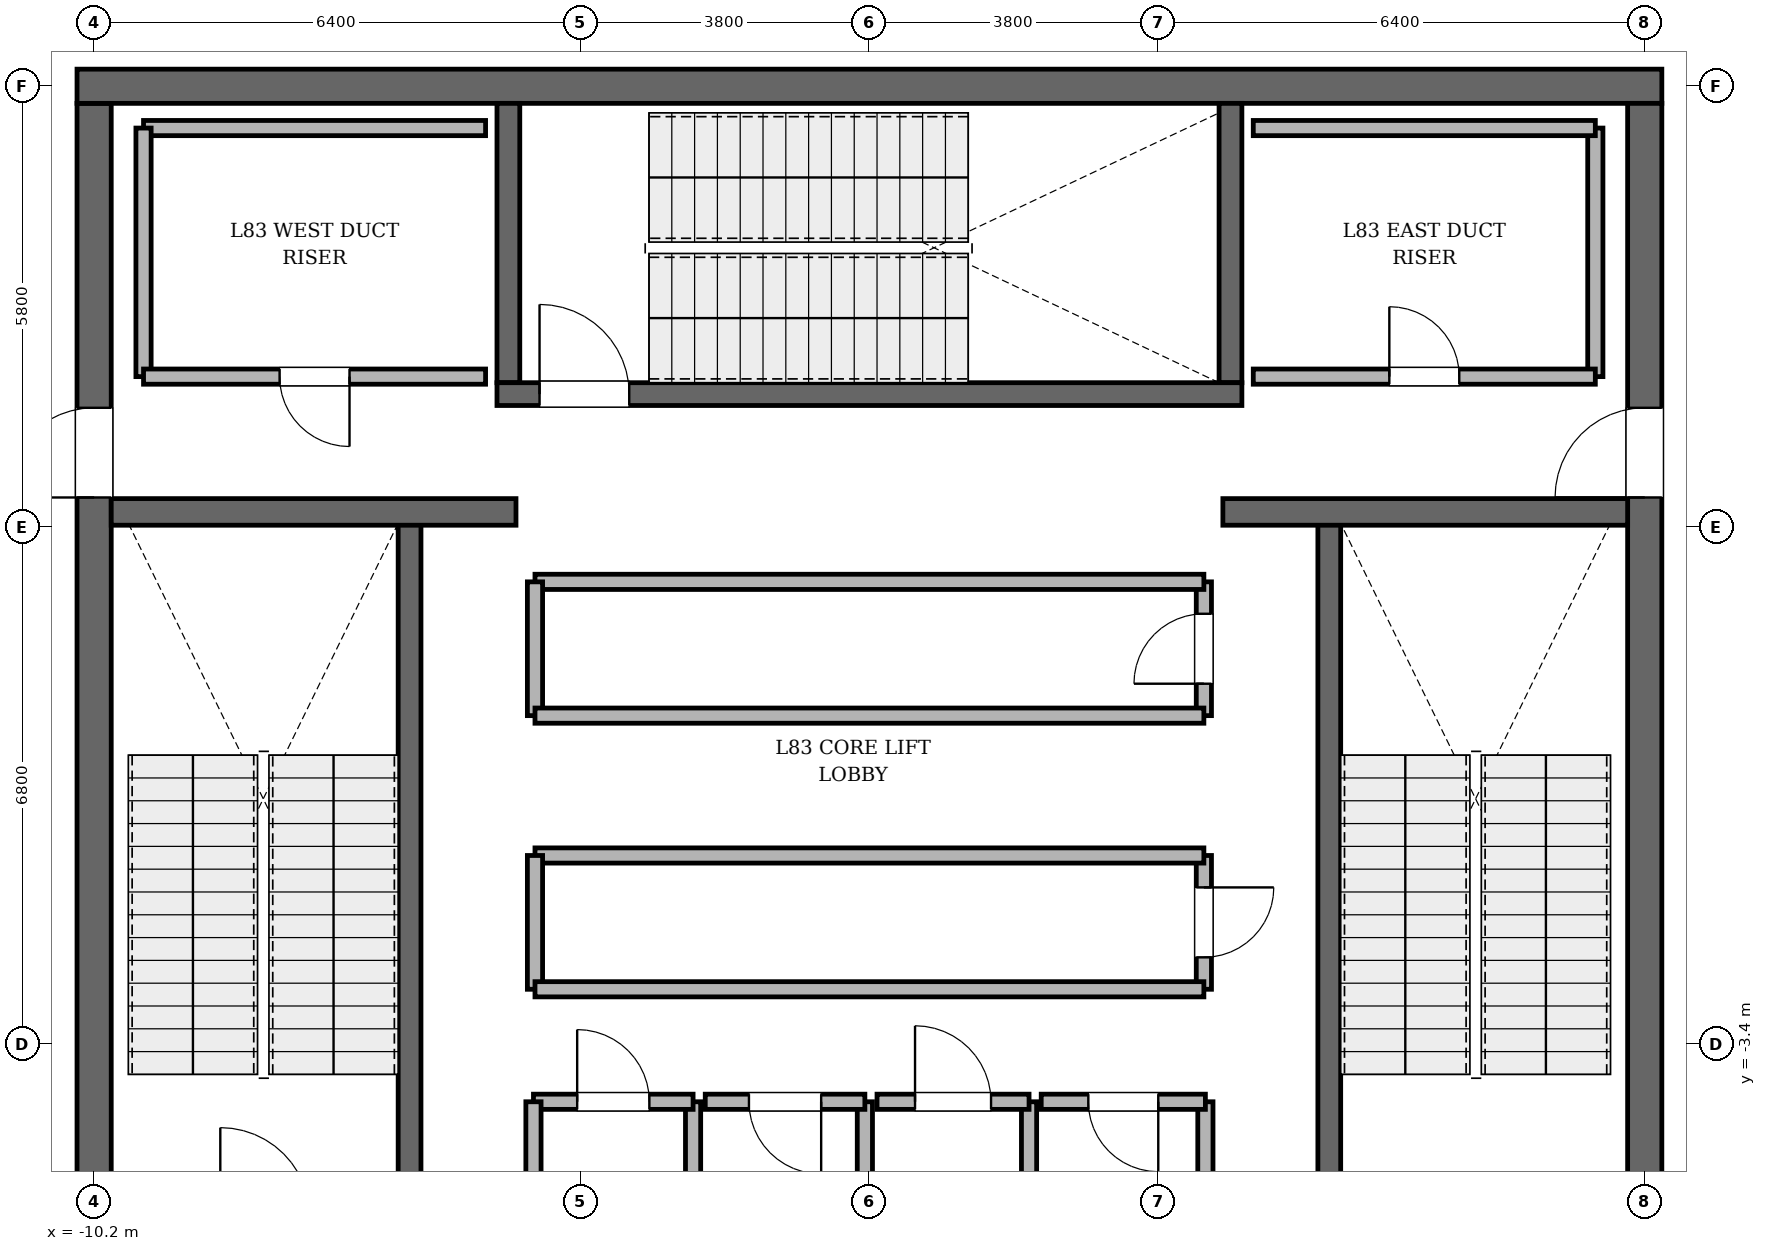
"""IFC4 building model, lengths in metres.
Left out: names, types, materials, properties, quantities, classifications, styles, units other than length and angle.
Written with IfcOpenShell. Run it as: python <this file> out.ifc"""

import sys

from ifc_helpers import new_model, si_unit, direction, frame, frame_2d, origin, place, context, subcontext, project, spatial, rectangle, extrude, element, fill, save


model = new_model("IFC4")
c1 = context("Model", 3, precision=1e-05, world=origin(), true_north=direction((0.0, 1.0)))
c2 = subcontext(c1, "Body", "Model", "MODEL_VIEW")
j1 = project(units=[si_unit("LENGTHUNIT", "METRE"), si_unit("PLANEANGLEUNIT", "RADIAN")], contexts=[c1])
p1 = place(None, origin())
s1 = spatial("IfcSite", under=j1, at=p1, CompositionType="ELEMENT")
p2 = place(p1, origin())
s2 = spatial("IfcBuilding", under=s1, at=p2, CompositionType="ELEMENT")
p3 = place(p2, frame((0.0, 0.0, 352.8)))
s3 = spatial("IfcBuildingStorey", under=s2, at=p3, CompositionType="ELEMENT", Elevation=352.8)
p4 = place(p3, frame((-10.2, -8.975, 0.0), z_axis=(0.0, 0.0, 1.0), x_axis=(0.0, 1.0, 0.0)))
e1 = element("IfcWall", 1, at=p4, inside=s3, PredefinedType="SHEAR", context=c2, shape_type="SweptSolid", body=[
    extrude(rectangle(XDim=17.95, YDim=0.45, at=frame_2d((8.975, 0.0))), origin(), (0.0, 0.0, 1.0), 4.5),
])
p5 = place(p4, frame((12.765, 0.0, 0.0)))
e2 = element("IfcOpeningElement", 2, at=p5, cuts=e1, PredefinedType="OPENING", context=c2, shape_type="SweptSolid", body=[
    extrude(rectangle(XDim=1.18, YDim=2.2, at=frame_2d((0.59, 1.1))), frame((0.0, 0.235, 0.0), z_axis=(0.0, -1.0, 0.0), x_axis=(1.0, 0.0, 0.0)), (0.0, 0.0, 1.0), 0.47),
])
p6 = place(p3, frame((-10.425, 9.2, 0.0), z_axis=(0.0, 0.0, 1.0), x_axis=(1.0, 0.0, 0.0)))
e3 = element("IfcWall", 3, at=p6, inside=s3, PredefinedType="SHEAR", context=c2, shape_type="SweptSolid", body=[
    extrude(rectangle(XDim=20.85, YDim=0.45, at=frame_2d((10.425, 0.0))), origin(), (0.0, 0.0, 1.0), 4.5),
])
p7 = place(p3, frame((10.2, 8.975, 0.0), z_axis=(0.0, 0.0, 1.0), x_axis=(0.0, -1.0, 0.0)))
e4 = element("IfcWall", 4, at=p7, inside=s3, PredefinedType="SHEAR", context=c2, shape_type="SweptSolid", body=[
    extrude(rectangle(XDim=17.95, YDim=0.45, at=frame_2d((8.975, 0.0))), origin(), (0.0, 0.0, 1.0), 4.5),
])
p8 = place(p7, frame((4.005, 0.0, 0.0)))
e5 = element("IfcOpeningElement", 5, at=p8, cuts=e4, PredefinedType="OPENING", context=c2, shape_type="SweptSolid", body=[
    extrude(rectangle(XDim=1.18, YDim=2.2, at=frame_2d((0.59, 1.1))), frame((0.0, 0.235, 0.0), z_axis=(0.0, -1.0, 0.0), x_axis=(1.0, 0.0, 0.0)), (0.0, 0.0, 1.0), 0.47),
])
for number, where, z_axis, x_axis in (
    (6, (-6.05, -5.5, 0.0), (0.0, 0.0, 1.0), (0.0, 1.0, 0.0)),
    (7, (6.05, 3.45, 0.0), (0.0, 0.0, 1.0), (0.0, -1.0, 0.0)),
):
    element("IfcWall", number, at=place(p3, frame(where, z_axis=z_axis, x_axis=x_axis)), inside=s3, PredefinedType="SOLIDWALL", context=c2, shape_type="SweptSolid", body=[
        extrude(rectangle(XDim=8.95, YDim=0.3, at=frame_2d((4.475, 0.0))), origin(), (0.0, 0.0, 1.0), 4.5),
    ])
for number, where, z_axis, x_axis in (
    (8, (-4.75, 5.3, 0.0), (0.0, 0.0, 1.0), (0.0, 1.0, 0.0)),
    (9, (4.75, 8.975, 0.0), (0.0, 0.0, 1.0), (0.0, -1.0, 0.0)),
):
    element("IfcWall", number, at=place(p3, frame(where, z_axis=z_axis, x_axis=x_axis)), inside=s3, PredefinedType="SOLIDWALL", context=c2, shape_type="SweptSolid", body=[
        extrude(rectangle(XDim=3.675, YDim=0.3, at=frame_2d((1.837, 0.0))), origin(), (0.0, 0.0, 1.0), 4.5),
    ])
p9 = place(p3, frame((-4.9, 5.15, 0.0), z_axis=(0.0, 0.0, 1.0), x_axis=(1.0, 0.0, 0.0)))
e10 = element("IfcWall", 10, at=p9, inside=s3, PredefinedType="SOLIDWALL", context=c2, shape_type="SweptSolid", body=[
    extrude(rectangle(XDim=9.8, YDim=0.3, at=frame_2d((4.9, 0.0))), origin(), (0.0, 0.0, 1.0), 4.5),
])
p10 = place(p9, frame((0.56, 0.0, 0.0)))
e11 = element("IfcOpeningElement", 11, at=p10, cuts=e10, PredefinedType="OPENING", context=c2, shape_type="SweptSolid", body=[
    extrude(rectangle(XDim=1.18, YDim=2.2, at=frame_2d((0.59, 1.1))), frame((0.0, 0.16, 0.0), z_axis=(0.0, -1.0, 0.0), x_axis=(1.0, 0.0, 0.0)), (0.0, 0.0, 1.0), 0.32),
])
for number, where, z_axis, x_axis in (
    (12, (-9.975, 3.6, 0.0), (0.0, 0.0, 1.0), (1.0, 0.0, 0.0)),
    (13, (4.65, 3.6, 0.0), (0.0, 0.0, 1.0), (1.0, 0.0, 0.0)),
):
    element("IfcWall", number, at=place(p3, frame(where, z_axis=z_axis, x_axis=x_axis)), inside=s3, PredefinedType="SOLIDWALL", context=c2, shape_type="SweptSolid", body=[
        extrude(rectangle(XDim=5.325, YDim=0.35, at=frame_2d((2.663, 0.0))), origin(), (0.0, 0.0, 1.0), 4.5),
    ])
p11 = place(p3, frame((-2.32, -5.9, 0.0), z_axis=(0.0, 0.0, 1.0), x_axis=(0.0, 1.0, 0.0)))
e14 = element("IfcWall", 14, at=p11, inside=s3, PredefinedType="SOLIDWALL", context=c2, shape_type="SweptSolid", body=[
    extrude(rectangle(XDim=1.74, YDim=0.2, at=frame_2d((0.87, 0.0))), origin(), (0.0, 0.0, 1.0), 4.28),
])
p12 = place(p3, frame((-2.32, -4.16, 0.0), z_axis=(0.0, 0.0, 1.0), x_axis=(-1.0, 0.0, 0.0)))
e15 = element("IfcWall", 15, at=p12, inside=s3, PredefinedType="SOLIDWALL", context=c2, shape_type="SweptSolid", body=[
    extrude(rectangle(XDim=2.1, YDim=0.2, at=frame_2d((1.05, 0.0))), origin(), (0.0, 0.0, 1.0), 4.28),
])
p13 = place(p12, frame((0.575, 0.0, 0.0)))
e16 = element("IfcOpeningElement", 16, at=p13, cuts=e15, PredefinedType="OPENING", context=c2, shape_type="SweptSolid", body=[
    extrude(rectangle(XDim=0.95, YDim=2.15, at=frame_2d((0.475, 1.075))), frame((0.0, 0.11, 0.0), z_axis=(0.0, -1.0, 0.0), x_axis=(1.0, 0.0, 0.0)), (0.0, 0.0, 1.0), 0.22),
])
for number, where, z_axis, x_axis in (
    (17, (-4.42, -4.16, 0.0), (0.0, 0.0, 1.0), (0.0, -1.0, 0.0)),
    (18, (-0.06, -5.9, 0.0), (0.0, 0.0, 1.0), (0.0, 1.0, 0.0)),
):
    element("IfcWall", number, at=place(p3, frame(where, z_axis=z_axis, x_axis=x_axis)), inside=s3, PredefinedType="SOLIDWALL", context=c2, shape_type="SweptSolid", body=[
        extrude(rectangle(XDim=1.74, YDim=0.2, at=frame_2d((0.87, 0.0))), origin(), (0.0, 0.0, 1.0), 4.28),
    ])
p14 = place(p3, frame((-0.06, -4.16, 0.0), z_axis=(0.0, 0.0, 1.0), x_axis=(-1.0, 0.0, 0.0)))
e19 = element("IfcWall", 19, at=p14, inside=s3, PredefinedType="SOLIDWALL", context=c2, shape_type="SweptSolid", body=[
    extrude(rectangle(XDim=2.1, YDim=0.2, at=frame_2d((1.05, 0.0))), origin(), (0.0, 0.0, 1.0), 4.28),
])
p15 = place(p14, frame((0.575, 0.0, 0.0)))
e20 = element("IfcOpeningElement", 20, at=p15, cuts=e19, PredefinedType="OPENING", context=c2, shape_type="SweptSolid", body=[
    extrude(rectangle(XDim=0.95, YDim=2.15, at=frame_2d((0.475, 1.075))), frame((0.0, 0.11, 0.0), z_axis=(0.0, -1.0, 0.0), x_axis=(1.0, 0.0, 0.0)), (0.0, 0.0, 1.0), 0.22),
])
p16 = place(p3, frame((2.1, -5.9, 0.0), z_axis=(0.0, 0.0, 1.0), x_axis=(0.0, 1.0, 0.0)))
e21 = element("IfcWall", 21, at=p16, inside=s3, PredefinedType="SOLIDWALL", context=c2, shape_type="SweptSolid", body=[
    extrude(rectangle(XDim=1.74, YDim=0.2, at=frame_2d((0.87, 0.0))), origin(), (0.0, 0.0, 1.0), 4.28),
])
p17 = place(p3, frame((2.1, -4.16, 0.0), z_axis=(0.0, 0.0, 1.0), x_axis=(-1.0, 0.0, 0.0)))
e22 = element("IfcWall", 22, at=p17, inside=s3, PredefinedType="SOLIDWALL", context=c2, shape_type="SweptSolid", body=[
    extrude(rectangle(XDim=2.0, YDim=0.2, at=frame_2d((1.0, 0.0))), origin(), (0.0, 0.0, 1.0), 4.28),
])
p18 = place(p17, frame((0.5, 0.0, 0.0)))
e23 = element("IfcOpeningElement", 23, at=p18, cuts=e22, PredefinedType="OPENING", context=c2, shape_type="SweptSolid", body=[
    extrude(rectangle(XDim=1.0, YDim=2.15, at=frame_2d((0.5, 1.075))), frame((0.0, 0.11, 0.0), z_axis=(0.0, -1.0, 0.0), x_axis=(1.0, 0.0, 0.0)), (0.0, 0.0, 1.0), 0.22),
])
p19 = place(p3, frame((4.42, -5.9, 0.0), z_axis=(0.0, 0.0, 1.0), x_axis=(0.0, 1.0, 0.0)))
e24 = element("IfcWall", 24, at=p19, inside=s3, PredefinedType="SOLIDWALL", context=c2, shape_type="SweptSolid", body=[
    extrude(rectangle(XDim=1.74, YDim=0.2, at=frame_2d((0.87, 0.0))), origin(), (0.0, 0.0, 1.0), 4.28),
])
p20 = place(p3, frame((4.42, -4.16, 0.0), z_axis=(0.0, 0.0, 1.0), x_axis=(-1.0, 0.0, 0.0)))
e25 = element("IfcWall", 25, at=p20, inside=s3, PredefinedType="SOLIDWALL", context=c2, shape_type="SweptSolid", body=[
    extrude(rectangle(XDim=2.16, YDim=0.2, at=frame_2d((1.08, 0.0))), origin(), (0.0, 0.0, 1.0), 4.28),
])
p21 = place(p20, frame((0.62, 0.0, 0.0)))
e26 = element("IfcOpeningElement", 26, at=p21, cuts=e25, PredefinedType="OPENING", context=c2, shape_type="SweptSolid", body=[
    extrude(rectangle(XDim=0.92, YDim=2.1, at=frame_2d((0.46, 1.05))), frame((0.0, 0.11, 0.0), z_axis=(0.0, -1.0, 0.0), x_axis=(1.0, 0.0, 0.0)), (0.0, 0.0, 1.0), 0.22),
])
p22 = place(p3, frame((4.4, -2.68, 0.0), z_axis=(0.0, 0.0, 1.0), x_axis=(0.0, 1.0, 0.0)))
e27 = element("IfcWall", 27, at=p22, inside=s3, PredefinedType="SOLIDWALL", context=c2, shape_type="SweptSolid", body=[
    extrude(rectangle(XDim=1.76, YDim=0.2, at=frame_2d((0.88, 0.0))), origin(), (0.0, 0.0, 1.0), 4.28),
])
p23 = place(p22, frame((0.42, 0.0, 0.0)))
e28 = element("IfcOpeningElement", 28, at=p23, cuts=e27, PredefinedType="OPENING", context=c2, shape_type="SweptSolid", body=[
    extrude(rectangle(XDim=0.92, YDim=2.1, at=frame_2d((0.46, 1.05))), frame((0.0, 0.11, 0.0), z_axis=(0.0, -1.0, 0.0), x_axis=(1.0, 0.0, 0.0)), (0.0, 0.0, 1.0), 0.22),
])
p24 = place(p3, frame((4.4, -0.92, 0.0), z_axis=(0.0, 0.0, 1.0), x_axis=(-1.0, 0.0, 0.0)))
e29 = element("IfcWall", 29, at=p24, inside=s3, PredefinedType="SOLIDWALL", context=c2, shape_type="SweptSolid", body=[
    extrude(rectangle(XDim=8.8, YDim=0.2, at=frame_2d((4.4, 0.0))), origin(), (0.0, 0.0, 1.0), 4.28),
])
p25 = place(p3, frame((-4.4, -0.92, 0.0), z_axis=(0.0, 0.0, 1.0), x_axis=(0.0, -1.0, 0.0)))
e30 = element("IfcWall", 30, at=p25, inside=s3, PredefinedType="SOLIDWALL", context=c2, shape_type="SweptSolid", body=[
    extrude(rectangle(XDim=1.76, YDim=0.2, at=frame_2d((0.88, 0.0))), origin(), (0.0, 0.0, 1.0), 4.28),
])
p26 = place(p3, frame((-4.4, -2.68, 0.0), z_axis=(0.0, 0.0, 1.0), x_axis=(1.0, 0.0, 0.0)))
e31 = element("IfcWall", 31, at=p26, inside=s3, PredefinedType="SOLIDWALL", context=c2, shape_type="SweptSolid", body=[
    extrude(rectangle(XDim=8.8, YDim=0.2, at=frame_2d((4.4, 0.0))), origin(), (0.0, 0.0, 1.0), 4.28),
])
p27 = place(p3, frame((4.4, 0.92, 0.0), z_axis=(0.0, 0.0, 1.0), x_axis=(0.0, 1.0, 0.0)))
e32 = element("IfcWall", 32, at=p27, inside=s3, PredefinedType="SOLIDWALL", context=c2, shape_type="SweptSolid", body=[
    extrude(rectangle(XDim=1.76, YDim=0.2, at=frame_2d((0.88, 0.0))), origin(), (0.0, 0.0, 1.0), 4.28),
])
p28 = place(p27, frame((0.42, 0.0, 0.0)))
e33 = element("IfcOpeningElement", 33, at=p28, cuts=e32, PredefinedType="OPENING", context=c2, shape_type="SweptSolid", body=[
    extrude(rectangle(XDim=0.92, YDim=2.1, at=frame_2d((0.46, 1.05))), frame((0.0, 0.11, 0.0), z_axis=(0.0, -1.0, 0.0), x_axis=(1.0, 0.0, 0.0)), (0.0, 0.0, 1.0), 0.22),
])
p29 = place(p3, frame((4.4, 2.68, 0.0), z_axis=(0.0, 0.0, 1.0), x_axis=(-1.0, 0.0, 0.0)))
e34 = element("IfcWall", 34, at=p29, inside=s3, PredefinedType="SOLIDWALL", context=c2, shape_type="SweptSolid", body=[
    extrude(rectangle(XDim=8.8, YDim=0.2, at=frame_2d((4.4, 0.0))), origin(), (0.0, 0.0, 1.0), 4.28),
])
p30 = place(p3, frame((-4.4, 2.68, 0.0), z_axis=(0.0, 0.0, 1.0), x_axis=(0.0, -1.0, 0.0)))
e35 = element("IfcWall", 35, at=p30, inside=s3, PredefinedType="SOLIDWALL", context=c2, shape_type="SweptSolid", body=[
    extrude(rectangle(XDim=1.76, YDim=0.2, at=frame_2d((0.88, 0.0))), origin(), (0.0, 0.0, 1.0), 4.28),
])
p31 = place(p3, frame((-4.4, 0.92, 0.0), z_axis=(0.0, 0.0, 1.0), x_axis=(1.0, 0.0, 0.0)))
e36 = element("IfcWall", 36, at=p31, inside=s3, PredefinedType="SOLIDWALL", context=c2, shape_type="SweptSolid", body=[
    extrude(rectangle(XDim=8.8, YDim=0.2, at=frame_2d((4.4, 0.0))), origin(), (0.0, 0.0, 1.0), 4.28),
])
p32 = place(p3, frame((-5.05, 8.65, 0.0), z_axis=(0.0, 0.0, 1.0), x_axis=(-1.0, 0.0, 0.0)))
e37 = element("IfcWall", 37, at=p32, inside=s3, PredefinedType="SOLIDWALL", context=c2, shape_type="SweptSolid", body=[
    extrude(rectangle(XDim=4.5, YDim=0.2, at=frame_2d((2.25, 0.0))), origin(), (0.0, 0.0, 1.0), 4.28),
])
p33 = place(p3, frame((-9.55, 8.65, 0.0), z_axis=(0.0, 0.0, 1.0), x_axis=(0.0, -1.0, 0.0)))
e38 = element("IfcWall", 38, at=p33, inside=s3, PredefinedType="SOLIDWALL", context=c2, shape_type="SweptSolid", body=[
    extrude(rectangle(XDim=3.27, YDim=0.2, at=frame_2d((1.635, 0.0))), origin(), (0.0, 0.0, 1.0), 4.28),
])
p34 = place(p3, frame((-9.55, 5.38, 0.0), z_axis=(0.0, 0.0, 1.0), x_axis=(1.0, 0.0, 0.0)))
e39 = element("IfcWall", 39, at=p34, inside=s3, PredefinedType="SOLIDWALL", context=c2, shape_type="SweptSolid", body=[
    extrude(rectangle(XDim=4.5, YDim=0.2, at=frame_2d((2.25, 0.0))), origin(), (0.0, 0.0, 1.0), 4.28),
])
p35 = place(p34, frame((1.79, 0.0, 0.0)))
e40 = element("IfcOpeningElement", 40, at=p35, cuts=e39, PredefinedType="OPENING", context=c2, shape_type="SweptSolid", body=[
    extrude(rectangle(XDim=0.92, YDim=2.1, at=frame_2d((0.46, 1.05))), frame((0.0, 0.11, 0.0), z_axis=(0.0, -1.0, 0.0), x_axis=(1.0, 0.0, 0.0)), (0.0, 0.0, 1.0), 0.22),
])
p36 = place(p3, frame((9.55, 5.38, 0.0), z_axis=(0.0, 0.0, 1.0), x_axis=(0.0, 1.0, 0.0)))
e41 = element("IfcWall", 41, at=p36, inside=s3, PredefinedType="SOLIDWALL", context=c2, shape_type="SweptSolid", body=[
    extrude(rectangle(XDim=3.27, YDim=0.2, at=frame_2d((1.635, 0.0))), origin(), (0.0, 0.0, 1.0), 4.28),
])
p37 = place(p3, frame((9.55, 8.65, 0.0), z_axis=(0.0, 0.0, 1.0), x_axis=(-1.0, 0.0, 0.0)))
e42 = element("IfcWall", 42, at=p37, inside=s3, PredefinedType="SOLIDWALL", context=c2, shape_type="SweptSolid", body=[
    extrude(rectangle(XDim=4.5, YDim=0.2, at=frame_2d((2.25, 0.0))), origin(), (0.0, 0.0, 1.0), 4.28),
])
p38 = place(p3, frame((5.05, 5.38, 0.0), z_axis=(0.0, 0.0, 1.0), x_axis=(1.0, 0.0, 0.0)))
e43 = element("IfcWall", 43, at=p38, inside=s3, PredefinedType="SOLIDWALL", context=c2, shape_type="SweptSolid", body=[
    extrude(rectangle(XDim=4.5, YDim=0.2, at=frame_2d((2.25, 0.0))), origin(), (0.0, 0.0, 1.0), 4.28),
])
p39 = place(p38, frame((1.79, 0.0, 0.0)))
e44 = element("IfcOpeningElement", 44, at=p39, cuts=e43, PredefinedType="OPENING", context=c2, shape_type="SweptSolid", body=[
    extrude(rectangle(XDim=0.92, YDim=2.1, at=frame_2d((0.46, 1.05))), frame((0.0, 0.11, 0.0), z_axis=(0.0, -1.0, 0.0), x_axis=(1.0, 0.0, 0.0)), (0.0, 0.0, 1.0), 0.22),
])
p40 = place(p10, origin())
e45 = element("IfcDoor", 45, at=p40, inside=s3, OperationType="SINGLE_SWING_LEFT", PredefinedType="DOOR", context=c2, shape_type="SweptSolid", body=[
    extrude(rectangle(XDim=1.18, YDim=2.2, at=frame_2d((0.59, 1.1))), frame((0.0, 0.025, 0.0), z_axis=(0.0, -1.0, 0.0), x_axis=(1.0, 0.0, 0.0)), (0.0, 0.0, 1.0), 0.05),
])
fill(e11, e45)
p41 = place(p5, origin())
e46 = element("IfcDoor", 46, at=p41, inside=s3, OperationType="SINGLE_SWING_LEFT", PredefinedType="DOOR", context=c2, shape_type="SweptSolid", body=[
    extrude(rectangle(XDim=1.18, YDim=2.2, at=frame_2d((0.59, 1.1))), frame((0.0, 0.025, 0.0), z_axis=(0.0, -1.0, 0.0), x_axis=(1.0, 0.0, 0.0)), (0.0, 0.0, 1.0), 0.05),
])
fill(e2, e46)
p42 = place(p8, origin())
e47 = element("IfcDoor", 47, at=p42, inside=s3, OperationType="SINGLE_SWING_RIGHT", PredefinedType="DOOR", context=c2, shape_type="SweptSolid", body=[
    extrude(rectangle(XDim=1.18, YDim=2.2, at=frame_2d((0.59, 1.1))), frame((0.0, 0.025, 0.0), z_axis=(0.0, -1.0, 0.0), x_axis=(1.0, 0.0, 0.0)), (0.0, 0.0, 1.0), 0.05),
])
fill(e5, e47)
p43 = place(p13, origin())
e48 = element("IfcDoor", 48, at=p43, inside=s3, OperationType="SINGLE_SWING_RIGHT", PredefinedType="DOOR", context=c2, shape_type="SweptSolid", body=[
    extrude(rectangle(XDim=0.95, YDim=2.15, at=frame_2d((0.475, 1.075))), frame((0.0, 0.025, 0.0), z_axis=(0.0, -1.0, 0.0), x_axis=(1.0, 0.0, 0.0)), (0.0, 0.0, 1.0), 0.05),
])
fill(e16, e48)
p44 = place(p15, origin())
e49 = element("IfcDoor", 49, at=p44, inside=s3, OperationType="SINGLE_SWING_LEFT", PredefinedType="DOOR", context=c2, shape_type="SweptSolid", body=[
    extrude(rectangle(XDim=0.95, YDim=2.15, at=frame_2d((0.475, 1.075))), frame((0.0, 0.025, 0.0), z_axis=(0.0, -1.0, 0.0), x_axis=(1.0, 0.0, 0.0)), (0.0, 0.0, 1.0), 0.05),
])
fill(e20, e49)
p45 = place(p18, origin())
e50 = element("IfcDoor", 50, at=p45, inside=s3, OperationType="SINGLE_SWING_RIGHT", PredefinedType="DOOR", context=c2, shape_type="SweptSolid", body=[
    extrude(rectangle(XDim=1.0, YDim=2.15, at=frame_2d((0.5, 1.075))), frame((0.0, 0.025, 0.0), z_axis=(0.0, -1.0, 0.0), x_axis=(1.0, 0.0, 0.0)), (0.0, 0.0, 1.0), 0.05),
])
fill(e23, e50)
p46 = place(p21, origin())
e51 = element("IfcDoor", 51, at=p46, inside=s3, OperationType="SINGLE_SWING_LEFT", PredefinedType="DOOR", context=c2, shape_type="SweptSolid", body=[
    extrude(rectangle(XDim=0.92, YDim=2.1, at=frame_2d((0.46, 1.05))), frame((0.0, 0.025, 0.0), z_axis=(0.0, -1.0, 0.0), x_axis=(1.0, 0.0, 0.0)), (0.0, 0.0, 1.0), 0.05),
])
fill(e26, e51)
p47 = place(p23, origin())
e52 = element("IfcDoor", 52, at=p47, inside=s3, OperationType="SINGLE_SWING_RIGHT", PredefinedType="DOOR", context=c2, shape_type="SweptSolid", body=[
    extrude(rectangle(XDim=0.92, YDim=2.1, at=frame_2d((0.46, 1.05))), frame((0.0, 0.025, 0.0), z_axis=(0.0, -1.0, 0.0), x_axis=(1.0, 0.0, 0.0)), (0.0, 0.0, 1.0), 0.05),
])
fill(e28, e52)
p48 = place(p28, origin())
e53 = element("IfcDoor", 53, at=p48, inside=s3, OperationType="SINGLE_SWING_LEFT", PredefinedType="DOOR", context=c2, shape_type="SweptSolid", body=[
    extrude(rectangle(XDim=0.92, YDim=2.1, at=frame_2d((0.46, 1.05))), frame((0.0, 0.025, 0.0), z_axis=(0.0, -1.0, 0.0), x_axis=(1.0, 0.0, 0.0)), (0.0, 0.0, 1.0), 0.05),
])
fill(e33, e53)
p49 = place(p35, origin())
e54 = element("IfcDoor", 54, at=p49, inside=s3, OperationType="SINGLE_SWING_RIGHT", PredefinedType="DOOR", context=c2, shape_type="SweptSolid", body=[
    extrude(rectangle(XDim=0.92, YDim=2.1, at=frame_2d((0.46, 1.05))), frame((0.0, 0.025, 0.0), z_axis=(0.0, -1.0, 0.0), x_axis=(1.0, 0.0, 0.0)), (0.0, 0.0, 1.0), 0.05),
])
fill(e40, e54)
p50 = place(p39, origin())
e55 = element("IfcDoor", 55, at=p50, inside=s3, OperationType="SINGLE_SWING_LEFT", PredefinedType="DOOR", context=c2, shape_type="SweptSolid", body=[
    extrude(rectangle(XDim=0.92, YDim=2.1, at=frame_2d((0.46, 1.05))), frame((0.0, 0.025, 0.0), z_axis=(0.0, -1.0, 0.0), x_axis=(1.0, 0.0, 0.0)), (0.0, 0.0, 1.0), 0.05),
])
fill(e44, e55)
save(model, sys.argv[1])
